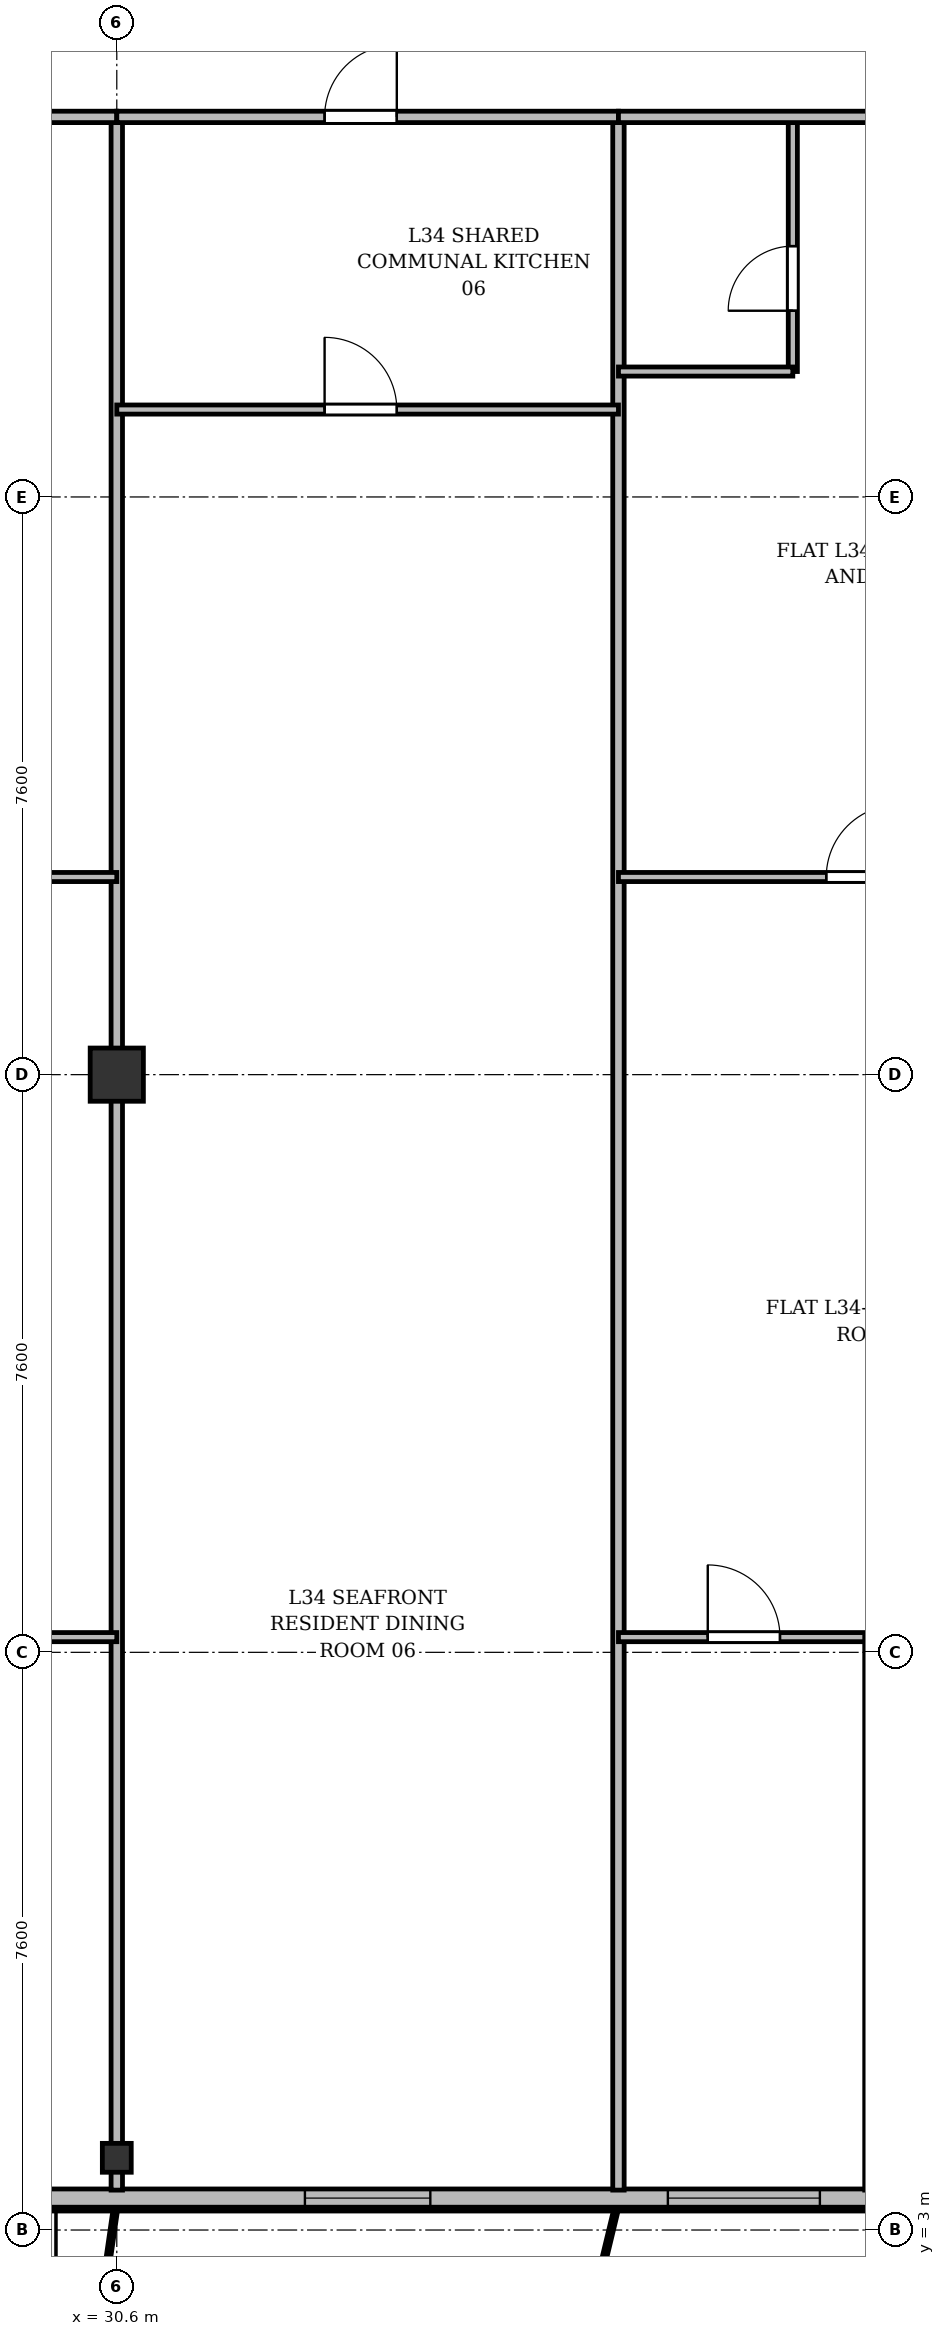
"""IFC4 building model, lengths in metres.
Left out: names, types, materials, properties, quantities, classifications, styles, units other than length and angle.
Written with IfcOpenShell. Run it as: python <this file> out.ifc"""

import sys

from ifc_helpers import new_model, si_unit, direction, frame, frame_2d, origin, origin_2d, place, context, subcontext, project, spatial, rectangle, i_section, extrude, source, transform, mapped, element, fill, save


model = new_model("IFC4")
c1 = context("Model", 3, precision=1e-05, world=origin(), true_north=direction((0.0, 1.0)))
c2 = subcontext(c1, "Body", "Model", "MODEL_VIEW")
j1 = project(units=[si_unit("LENGTHUNIT", "METRE"), si_unit("PLANEANGLEUNIT", "RADIAN")], contexts=[c1])
p1 = place(None, origin())
s1 = spatial("IfcSite", under=j1, at=p1, CompositionType="ELEMENT")
p2 = place(p1, origin())
s2 = spatial("IfcBuilding", under=s1, at=p2, CompositionType="ELEMENT")
p3 = place(p2, frame((0.0, 0.0, 132.1)))
s3 = spatial("IfcBuildingStorey", under=s2, at=p3, CompositionType="ELEMENT", Elevation=132.1)
m1 = source(origin(), c2, "Body", "SweptSolid", [
    extrude(i_section(OverallWidth=0.38, OverallDepth=0.38, WebThickness=0.02, FlangeThickness=0.03, at=origin_2d()), origin(), (0.0, 0.0, 1.0), 3.6),
])
p4 = place(p3, frame((30.6, 3.95, 0.0), z_axis=(0.0, 0.0, 1.0), x_axis=(1.0, 0.0, 0.0)))
e1 = element("IfcColumn", 1, at=p4, inside=s3, PredefinedType="COLUMN", context=c2, shape_type="MappedRepresentation", body=[
    mapped(m1, transform((0.0, 0.0, 0.0), x_axis=(1.0, 0.0, 0.0), y_axis=(0.0, 1.0, 0.0), z_axis=(0.0, 0.0, 1.0), scale=1.0)),
])
m2 = source(origin(), c2, "Body", "SweptSolid", [
    extrude(rectangle(XDim=0.7, YDim=0.7, at=origin_2d()), origin(), (0.0, 0.0, 1.0), 3.6),
])
p5 = place(p3, frame((30.6, 18.2, 0.0), z_axis=(0.0, 0.0, 1.0), x_axis=(1.0, 0.0, 0.0)))
e2 = element("IfcColumn", 2, at=p5, inside=s3, PredefinedType="COLUMN", context=c2, shape_type="MappedRepresentation", body=[
    mapped(m2, transform((0.0, 0.0, 0.0), x_axis=(1.0, 0.0, 0.0), y_axis=(0.0, 1.0, 0.0), z_axis=(0.0, 0.0, 1.0), scale=1.0)),
])
p6 = place(p3, frame((63.6, 3.42, 0.0), z_axis=(0.0, 0.0, 1.0), x_axis=(-1.0, 0.0, 0.0)))
e3 = element("IfcWall", 3, at=p6, inside=s3, PredefinedType="SOLIDWALL", context=c2, shape_type="SweptSolid", body=[
    extrude(rectangle(XDim=52.8, YDim=0.24, at=frame_2d((26.4, 0.0))), origin(), (0.0, 0.0, 1.0), 3.35),
])
p7 = place(p6, frame((0.42, 0.0, 0.9)))
e4 = element("IfcOpeningElement", 4, at=p7, cuts=e3, PredefinedType="OPENING", context=c2, shape_type="SweptSolid", body=[
    extrude(rectangle(XDim=1.65, YDim=1.85, at=frame_2d((0.825, 0.925))), frame((0.0, 0.13, 0.0), z_axis=(0.0, -1.0, 0.0), x_axis=(1.0, 0.0, 0.0)), (0.0, 0.0, 1.0), 0.26),
])
p8 = place(p6, frame((2.75, 0.0, 0.9)))
e5 = element("IfcOpeningElement", 5, at=p8, cuts=e3, PredefinedType="OPENING", context=c2, shape_type="SweptSolid", body=[
    extrude(rectangle(XDim=1.8, YDim=1.8, at=frame_2d((0.9, 0.9))), frame((0.0, 0.13, 0.0), z_axis=(0.0, -1.0, 0.0), x_axis=(1.0, 0.0, 0.0)), (0.0, 0.0, 1.0), 0.26),
])
p9 = place(p6, frame((5.902, 0.0, 0.0)))
e6 = element("IfcOpeningElement", 6, at=p9, cuts=e3, PredefinedType="OPENING", context=c2, shape_type="SweptSolid", body=[
    extrude(rectangle(XDim=1.2, YDim=2.2, at=frame_2d((0.6, 1.1))), frame((0.0, 0.13, 0.0), z_axis=(0.0, -1.0, 0.0), x_axis=(1.0, 0.0, 0.0)), (0.0, 0.0, 1.0), 0.26),
])
p10 = place(p6, frame((7.65, 0.0, 0.9)))
e7 = element("IfcOpeningElement", 7, at=p10, cuts=e3, PredefinedType="OPENING", context=c2, shape_type="SweptSolid", body=[
    extrude(rectangle(XDim=1.5, YDim=1.75, at=frame_2d((0.75, 0.875))), frame((0.0, 0.13, 0.0), z_axis=(0.0, -1.0, 0.0), x_axis=(1.0, 0.0, 0.0)), (0.0, 0.0, 1.0), 0.26),
])
p11 = place(p6, frame((10.0, 0.0, 0.9)))
e8 = element("IfcOpeningElement", 8, at=p11, cuts=e3, PredefinedType="OPENING", context=c2, shape_type="SweptSolid", body=[
    extrude(rectangle(XDim=2.0, YDim=1.95, at=frame_2d((1.0, 0.975))), frame((0.0, 0.13, 0.0), z_axis=(0.0, -1.0, 0.0), x_axis=(1.0, 0.0, 0.0)), (0.0, 0.0, 1.0), 0.26),
])
p12 = place(p6, frame((12.975, 0.0, 0.9)))
e9 = element("IfcOpeningElement", 9, at=p12, cuts=e3, PredefinedType="OPENING", context=c2, shape_type="SweptSolid", body=[
    extrude(rectangle(XDim=1.65, YDim=1.85, at=frame_2d((0.825, 0.925))), frame((0.0, 0.13, 0.0), z_axis=(0.0, -1.0, 0.0), x_axis=(1.0, 0.0, 0.0)), (0.0, 0.0, 1.0), 0.26),
])
p13 = place(p6, frame((15.3, 0.0, 0.9)))
e10 = element("IfcOpeningElement", 10, at=p13, cuts=e3, PredefinedType="OPENING", context=c2, shape_type="SweptSolid", body=[
    extrude(rectangle(XDim=1.8, YDim=1.8, at=frame_2d((0.9, 0.9))), frame((0.0, 0.13, 0.0), z_axis=(0.0, -1.0, 0.0), x_axis=(1.0, 0.0, 0.0)), (0.0, 0.0, 1.0), 0.26),
])
p14 = place(p6, frame((17.85, 0.0, 0.9)))
e11 = element("IfcOpeningElement", 11, at=p14, cuts=e3, PredefinedType="OPENING", context=c2, shape_type="SweptSolid", body=[
    extrude(rectangle(XDim=1.5, YDim=1.75, at=frame_2d((0.75, 0.875))), frame((0.0, 0.13, 0.0), z_axis=(0.0, -1.0, 0.0), x_axis=(1.0, 0.0, 0.0)), (0.0, 0.0, 1.0), 0.26),
])
p15 = place(p6, frame((20.7, 0.0, 0.9)))
e12 = element("IfcOpeningElement", 12, at=p15, cuts=e3, PredefinedType="OPENING", context=c2, shape_type="SweptSolid", body=[
    extrude(rectangle(XDim=1.5, YDim=1.75, at=frame_2d((0.75, 0.875))), frame((0.0, 0.13, 0.0), z_axis=(0.0, -1.0, 0.0), x_axis=(1.0, 0.0, 0.0)), (0.0, 0.0, 1.0), 0.26),
])
p16 = place(p6, frame((23.75, 0.0, 0.9)))
e13 = element("IfcOpeningElement", 13, at=p16, cuts=e3, PredefinedType="OPENING", context=c2, shape_type="SweptSolid", body=[
    extrude(rectangle(XDim=2.0, YDim=1.95, at=frame_2d((1.0, 0.975))), frame((0.0, 0.13, 0.0), z_axis=(0.0, -1.0, 0.0), x_axis=(1.0, 0.0, 0.0)), (0.0, 0.0, 1.0), 0.26),
])
p17 = place(p6, frame((28.875, 0.0, 0.9)))
e14 = element("IfcOpeningElement", 14, at=p17, cuts=e3, PredefinedType="OPENING", context=c2, shape_type="SweptSolid", body=[
    extrude(rectangle(XDim=1.65, YDim=1.85, at=frame_2d((0.825, 0.925))), frame((0.0, 0.13, 0.0), z_axis=(0.0, -1.0, 0.0), x_axis=(1.0, 0.0, 0.0)), (0.0, 0.0, 1.0), 0.26),
])
p18 = place(p6, frame((34.478, 0.0, 0.0)))
e15 = element("IfcOpeningElement", 15, at=p18, cuts=e3, PredefinedType="OPENING", context=c2, shape_type="SweptSolid", body=[
    extrude(rectangle(XDim=1.2, YDim=2.2, at=frame_2d((0.6, 1.1))), frame((0.0, 0.13, 0.0), z_axis=(0.0, -1.0, 0.0), x_axis=(1.0, 0.0, 0.0)), (0.0, 0.0, 1.0), 0.26),
])
p19 = place(p6, frame((37.3, 0.0, 0.9)))
e16 = element("IfcOpeningElement", 16, at=p19, cuts=e3, PredefinedType="OPENING", context=c2, shape_type="SweptSolid", body=[
    extrude(rectangle(XDim=2.2, YDim=1.8, at=frame_2d((1.1, 0.9))), frame((0.0, 0.13, 0.0), z_axis=(0.0, -1.0, 0.0), x_axis=(1.0, 0.0, 0.0)), (0.0, 0.0, 1.0), 0.26),
])
p20 = place(p6, frame((41.05, 0.0, 0.9)))
e17 = element("IfcOpeningElement", 17, at=p20, cuts=e3, PredefinedType="OPENING", context=c2, shape_type="SweptSolid", body=[
    extrude(rectangle(XDim=1.5, YDim=1.75, at=frame_2d((0.75, 0.875))), frame((0.0, 0.13, 0.0), z_axis=(0.0, -1.0, 0.0), x_axis=(1.0, 0.0, 0.0)), (0.0, 0.0, 1.0), 0.26),
])
p21 = place(p6, frame((43.65, 0.0, 0.9)))
e18 = element("IfcOpeningElement", 18, at=p21, cuts=e3, PredefinedType="OPENING", context=c2, shape_type="SweptSolid", body=[
    extrude(rectangle(XDim=1.5, YDim=1.75, at=frame_2d((0.75, 0.875))), frame((0.0, 0.13, 0.0), z_axis=(0.0, -1.0, 0.0), x_axis=(1.0, 0.0, 0.0)), (0.0, 0.0, 1.0), 0.26),
])
p22 = place(p6, frame((45.775, 0.0, 0.9)))
e19 = element("IfcOpeningElement", 19, at=p22, cuts=e3, PredefinedType="OPENING", context=c2, shape_type="SweptSolid", body=[
    extrude(rectangle(XDim=1.65, YDim=1.85, at=frame_2d((0.825, 0.925))), frame((0.0, 0.13, 0.0), z_axis=(0.0, -1.0, 0.0), x_axis=(1.0, 0.0, 0.0)), (0.0, 0.0, 1.0), 0.26),
])
p23 = place(p6, frame((48.1, 0.0, 0.9)))
e20 = element("IfcOpeningElement", 20, at=p23, cuts=e3, PredefinedType="OPENING", context=c2, shape_type="SweptSolid", body=[
    extrude(rectangle(XDim=1.8, YDim=1.8, at=frame_2d((0.9, 0.9))), frame((0.0, 0.13, 0.0), z_axis=(0.0, -1.0, 0.0), x_axis=(1.0, 0.0, 0.0)), (0.0, 0.0, 1.0), 0.26),
])
p24 = place(p6, frame((50.705, 0.0, 0.9)))
e21 = element("IfcOpeningElement", 21, at=p24, cuts=e3, PredefinedType="OPENING", context=c2, shape_type="SweptSolid", body=[
    extrude(rectangle(XDim=1.5, YDim=1.75, at=frame_2d((0.75, 0.875))), frame((0.0, 0.13, 0.0), z_axis=(0.0, -1.0, 0.0), x_axis=(1.0, 0.0, 0.0)), (0.0, 0.0, 1.0), 0.26),
])
p25 = place(p3, frame((30.6, 3.525, 0.0), z_axis=(0.0, 0.0, 1.0), x_axis=(0.0, 1.0, 0.0)))
e22 = element("IfcWall", 22, at=p25, inside=s3, PredefinedType="PARTITIONING", context=c2, shape_type="SweptSolid", body=[
    extrude(rectangle(XDim=27.275, YDim=0.15, at=frame_2d((13.638, 0.0))), origin(), (0.0, 0.0, 1.0), 2.85),
])
p26 = place(p3, frame((37.2, 3.525, 0.0), z_axis=(0.0, 0.0, 1.0), x_axis=(0.0, 1.0, 0.0)))
e23 = element("IfcWall", 23, at=p26, inside=s3, PredefinedType="PARTITIONING", context=c2, shape_type="SweptSolid", body=[
    extrude(rectangle(XDim=27.275, YDim=0.15, at=frame_2d((13.638, 0.0))), origin(), (0.0, 0.0, 1.0), 2.75),
])
p27 = place(p3, frame((23.4, 20.8, 0.0), z_axis=(0.0, 0.0, 1.0), x_axis=(1.0, 0.0, 0.0)))
e24 = element("IfcWall", 24, at=p27, inside=s3, PredefinedType="PARTITIONING", context=c2, shape_type="SweptSolid", body=[
    extrude(rectangle(XDim=7.2, YDim=0.12, at=frame_2d((3.6, 0.0))), origin(), (0.0, 0.0, 1.0), 2.85),
])
p28 = place(p27, frame((3.125, 0.0, 0.0)))
e25 = element("IfcOpeningElement", 25, at=p28, cuts=e24, PredefinedType="OPENING", context=c2, shape_type="SweptSolid", body=[
    extrude(rectangle(XDim=0.95, YDim=2.15, at=frame_2d((0.475, 1.075))), frame((0.0, 0.07, 0.0), z_axis=(0.0, -1.0, 0.0), x_axis=(1.0, 0.0, 0.0)), (0.0, 0.0, 1.0), 0.14),
])
p29 = place(p3, frame((23.4, 30.8, 0.0), z_axis=(0.0, 0.0, 1.0), x_axis=(1.0, 0.0, 0.0)))
e26 = element("IfcWall", 26, at=p29, inside=s3, PredefinedType="PARTITIONING", context=c2, shape_type="SweptSolid", body=[
    extrude(rectangle(XDim=7.2, YDim=0.15, at=frame_2d((3.6, 0.0))), origin(), (0.0, 0.0, 1.0), 2.85),
])
p30 = place(p29, frame((4.706, 0.0, 0.0)))
e27 = element("IfcOpeningElement", 27, at=p30, cuts=e26, PredefinedType="OPENING", context=c2, shape_type="SweptSolid", body=[
    extrude(rectangle(XDim=0.95, YDim=2.15, at=frame_2d((0.475, 1.075))), frame((0.0, 0.085, 0.0), z_axis=(0.0, -1.0, 0.0), x_axis=(1.0, 0.0, 0.0)), (0.0, 0.0, 1.0), 0.17),
])
p31 = place(p3, frame((27.0, 10.8, 0.0), z_axis=(0.0, 0.0, 1.0), x_axis=(1.0, 0.0, 0.0)))
e28 = element("IfcWall", 28, at=p31, inside=s3, PredefinedType="PARTITIONING", context=c2, shape_type="SweptSolid", body=[
    extrude(rectangle(XDim=3.6, YDim=0.12, at=frame_2d((1.8, 0.0))), origin(), (0.0, 0.0, 1.0), 2.85),
])
p32 = place(p31, frame((1.325, 0.0, 0.0)))
e29 = element("IfcOpeningElement", 29, at=p32, cuts=e28, PredefinedType="OPENING", context=c2, shape_type="SweptSolid", body=[
    extrude(rectangle(XDim=0.95, YDim=2.15, at=frame_2d((0.475, 1.075))), frame((0.0, 0.07, 0.0), z_axis=(0.0, -1.0, 0.0), x_axis=(1.0, 0.0, 0.0)), (0.0, 0.0, 1.0), 0.14),
])
p33 = place(p3, frame((30.6, 30.8, 0.0), z_axis=(0.0, 0.0, 1.0), x_axis=(1.0, 0.0, 0.0)))
e30 = element("IfcWall", 30, at=p33, inside=s3, PredefinedType="PARTITIONING", context=c2, shape_type="SweptSolid", body=[
    extrude(rectangle(XDim=6.6, YDim=0.15, at=frame_2d((3.3, 0.0))), origin(), (0.0, 0.0, 1.0), 2.85),
])
p34 = place(p33, frame((2.734, 0.0, 0.0)))
e31 = element("IfcOpeningElement", 31, at=p34, cuts=e30, PredefinedType="OPENING", context=c2, shape_type="SweptSolid", body=[
    extrude(rectangle(XDim=0.95, YDim=2.15, at=frame_2d((0.475, 1.075))), frame((0.0, 0.085, 0.0), z_axis=(0.0, -1.0, 0.0), x_axis=(1.0, 0.0, 0.0)), (0.0, 0.0, 1.0), 0.17),
])
p35 = place(p3, frame((30.6, 26.95, 0.0), z_axis=(0.0, 0.0, 1.0), x_axis=(1.0, 0.0, 0.0)))
e32 = element("IfcWall", 32, at=p35, inside=s3, PredefinedType="PARTITIONING", context=c2, shape_type="SweptSolid", body=[
    extrude(rectangle(XDim=6.6, YDim=0.12, at=frame_2d((3.3, 0.0))), origin(), (0.0, 0.0, 1.0), 2.85),
])
p36 = place(p35, frame((2.734, 0.0, 0.0)))
e33 = element("IfcOpeningElement", 33, at=p36, cuts=e32, PredefinedType="OPENING", context=c2, shape_type="SweptSolid", body=[
    extrude(rectangle(XDim=0.95, YDim=2.15, at=frame_2d((0.475, 1.075))), frame((0.0, 0.07, 0.0), z_axis=(0.0, -1.0, 0.0), x_axis=(1.0, 0.0, 0.0)), (0.0, 0.0, 1.0), 0.14),
])
p37 = place(p3, frame((37.2, 20.8, 0.0), z_axis=(0.0, 0.0, 1.0), x_axis=(1.0, 0.0, 0.0)))
e34 = element("IfcWall", 34, at=p37, inside=s3, PredefinedType="PARTITIONING", context=c2, shape_type="SweptSolid", body=[
    extrude(rectangle(XDim=6.6, YDim=0.12, at=frame_2d((3.3, 0.0))), origin(), (0.0, 0.0, 1.0), 2.85),
])
p38 = place(p37, frame((2.734, 0.0, 0.0)))
e35 = element("IfcOpeningElement", 35, at=p38, cuts=e34, PredefinedType="OPENING", context=c2, shape_type="SweptSolid", body=[
    extrude(rectangle(XDim=0.95, YDim=2.15, at=frame_2d((0.475, 1.075))), frame((0.0, 0.07, 0.0), z_axis=(0.0, -1.0, 0.0), x_axis=(1.0, 0.0, 0.0)), (0.0, 0.0, 1.0), 0.14),
])
p39 = place(p3, frame((39.494, 27.45, 0.0), z_axis=(0.0, 0.0, 1.0), x_axis=(0.0, 1.0, 0.0)))
e36 = element("IfcWall", 36, at=p39, inside=s3, PredefinedType="PARTITIONING", context=c2, shape_type="SweptSolid", body=[
    extrude(rectangle(XDim=3.35, YDim=0.12, at=frame_2d((1.675, 0.0))), origin(), (0.0, 0.0, 1.0), 3.35),
])
p40 = place(p39, frame((0.8, 0.0, 0.0)))
e37 = element("IfcOpeningElement", 37, at=p40, cuts=e36, PredefinedType="OPENING", context=c2, shape_type="SweptSolid", body=[
    extrude(rectangle(XDim=0.85, YDim=2.1, at=frame_2d((0.425, 1.05))), frame((0.0, 0.07, 0.0), z_axis=(0.0, -1.0, 0.0), x_axis=(1.0, 0.0, 0.0)), (0.0, 0.0, 1.0), 0.14),
])
p41 = place(p3, frame((37.2, 27.45, 0.0), z_axis=(0.0, 0.0, 1.0), x_axis=(1.0, 0.0, 0.0)))
e38 = element("IfcWall", 38, at=p41, inside=s3, PredefinedType="PARTITIONING", context=c2, shape_type="SweptSolid", body=[
    extrude(rectangle(XDim=2.294, YDim=0.12, at=frame_2d((1.147, 0.0))), origin(), (0.0, 0.0, 1.0), 3.35),
])
p42 = place(p3, frame((37.2, 30.8, 0.0), z_axis=(0.0, 0.0, 1.0), x_axis=(1.0, 0.0, 0.0)))
e39 = element("IfcWall", 39, at=p42, inside=s3, PredefinedType="PARTITIONING", context=c2, shape_type="SweptSolid", body=[
    extrude(rectangle(XDim=6.6, YDim=0.15, at=frame_2d((3.3, 0.0))), origin(), (0.0, 0.0, 1.0), 2.85),
])
p43 = place(p42, frame((4.337, 0.0, 0.0)))
e40 = element("IfcOpeningElement", 40, at=p43, cuts=e39, PredefinedType="OPENING", context=c2, shape_type="SweptSolid", body=[
    extrude(rectangle(XDim=0.95, YDim=2.15, at=frame_2d((0.475, 1.075))), frame((0.0, 0.085, 0.0), z_axis=(0.0, -1.0, 0.0), x_axis=(1.0, 0.0, 0.0)), (0.0, 0.0, 1.0), 0.17),
])
p44 = place(p3, frame((37.2, 10.8, 0.0), z_axis=(0.0, 0.0, 1.0), x_axis=(1.0, 0.0, 0.0)))
e41 = element("IfcWall", 41, at=p44, inside=s3, PredefinedType="PARTITIONING", context=c2, shape_type="SweptSolid", body=[
    extrude(rectangle(XDim=3.3, YDim=0.12, at=frame_2d((1.65, 0.0))), origin(), (0.0, 0.0, 1.0), 3.0),
])
p45 = place(p44, frame((1.175, 0.0, 0.0)))
e42 = element("IfcOpeningElement", 42, at=p45, cuts=e41, PredefinedType="OPENING", context=c2, shape_type="SweptSolid", body=[
    extrude(rectangle(XDim=0.95, YDim=2.15, at=frame_2d((0.475, 1.075))), frame((0.0, 0.07, 0.0), z_axis=(0.0, -1.0, 0.0), x_axis=(1.0, 0.0, 0.0)), (0.0, 0.0, 1.0), 0.14),
])
p46 = place(p3, frame((40.5, 3.525, 0.0), z_axis=(0.0, 0.0, 1.0), x_axis=(0.0, 1.0, 0.0)))
e43 = element("IfcWall", 43, at=p46, inside=s3, PredefinedType="PARTITIONING", context=c2, shape_type="SweptSolid", body=[
    extrude(rectangle(XDim=7.275, YDim=0.12, at=frame_2d((3.638, 0.0))), origin(), (0.0, 0.0, 1.0), 2.75),
])
m3 = source(origin(), c2, "Body", "SweptSolid", [
    extrude(rectangle(XDim=2.0, YDim=1.95, at=frame_2d((1.0, 0.975))), frame((0.0, 0.03, 0.0), z_axis=(0.0, -1.0, 0.0), x_axis=(1.0, 0.0, 0.0)), (0.0, 0.0, 1.0), 0.06),
])
p47 = place(p16, origin())
e44 = element("IfcWindow", 44, at=p47, inside=s3, PartitioningType="SINGLE_PANEL", PredefinedType="WINDOW", context=c2, shape_type="MappedRepresentation", body=[
    mapped(m3, transform((0.0, 0.0, 0.0), x_axis=(1.0, 0.0, 0.0), y_axis=(0.0, 1.0, 0.0), z_axis=(0.0, 0.0, 1.0), scale=1.0)),
])
fill(e13, e44)
m4 = source(origin(), c2, "Body", "SweptSolid", [
    extrude(rectangle(XDim=1.65, YDim=1.85, at=frame_2d((0.825, 0.925))), frame((0.0, 0.03, 0.0), z_axis=(0.0, -1.0, 0.0), x_axis=(1.0, 0.0, 0.0)), (0.0, 0.0, 1.0), 0.06),
])
p48 = place(p17, origin())
e45 = element("IfcWindow", 45, at=p48, inside=s3, PartitioningType="SINGLE_PANEL", PredefinedType="WINDOW", context=c2, shape_type="MappedRepresentation", body=[
    mapped(m4, transform((0.0, 0.0, 0.0), x_axis=(1.0, 0.0, 0.0), y_axis=(0.0, 1.0, 0.0), z_axis=(0.0, 0.0, 1.0), scale=1.0)),
])
fill(e14, e45)
m5 = source(origin(), c2, "Body", "SweptSolid", [
    extrude(rectangle(XDim=0.95, YDim=2.15, at=frame_2d((0.475, 1.075))), frame((0.0, 0.025, 0.0), z_axis=(0.0, -1.0, 0.0), x_axis=(1.0, 0.0, 0.0)), (0.0, 0.0, 1.0), 0.05),
])
p49 = place(p34, origin())
e46 = element("IfcDoor", 46, at=p49, inside=s3, OperationType="SINGLE_SWING_RIGHT", PredefinedType="DOOR", context=c2, shape_type="MappedRepresentation", body=[
    mapped(m5, transform((0.0, 0.0, 0.0), x_axis=(1.0, 0.0, 0.0), y_axis=(0.0, 1.0, 0.0), z_axis=(0.0, 0.0, 1.0), scale=1.0)),
])
fill(e31, e46)
p50 = place(p36, origin())
e47 = element("IfcDoor", 47, at=p50, inside=s3, OperationType="SINGLE_SWING_LEFT", PredefinedType="DOOR", context=c2, shape_type="MappedRepresentation", body=[
    mapped(m5, transform((0.0, 0.0, 0.0), x_axis=(1.0, 0.0, 0.0), y_axis=(0.0, 1.0, 0.0), z_axis=(0.0, 0.0, 1.0), scale=1.0)),
])
fill(e33, e47)
p51 = place(p38, origin())
e48 = element("IfcDoor", 48, at=p51, inside=s3, OperationType="SINGLE_SWING_RIGHT", PredefinedType="DOOR", context=c2, shape_type="MappedRepresentation", body=[
    mapped(m5, transform((0.0, 0.0, 0.0), x_axis=(1.0, 0.0, 0.0), y_axis=(0.0, 1.0, 0.0), z_axis=(0.0, 0.0, 1.0), scale=1.0)),
])
fill(e35, e48)
m6 = source(origin(), c2, "Body", "SweptSolid", [
    extrude(rectangle(XDim=0.85, YDim=2.1, at=frame_2d((0.425, 1.05))), frame((0.0, 0.025, 0.0), z_axis=(0.0, -1.0, 0.0), x_axis=(1.0, 0.0, 0.0)), (0.0, 0.0, 1.0), 0.05),
])
p52 = place(p40, origin())
e49 = element("IfcDoor", 49, at=p52, inside=s3, OperationType="SINGLE_SWING_LEFT", PredefinedType="DOOR", context=c2, shape_type="MappedRepresentation", body=[
    mapped(m6, transform((0.0, 0.0, 0.0), x_axis=(1.0, 0.0, 0.0), y_axis=(0.0, 1.0, 0.0), z_axis=(0.0, 0.0, 1.0), scale=1.0)),
])
fill(e37, e49)
p53 = place(p45, origin())
e50 = element("IfcDoor", 50, at=p53, inside=s3, OperationType="SINGLE_SWING_LEFT", PredefinedType="DOOR", context=c2, shape_type="MappedRepresentation", body=[
    mapped(m5, transform((0.0, 0.0, 0.0), x_axis=(1.0, 0.0, 0.0), y_axis=(0.0, 1.0, 0.0), z_axis=(0.0, 0.0, 1.0), scale=1.0)),
])
fill(e42, e50)
save(model, sys.argv[1])
